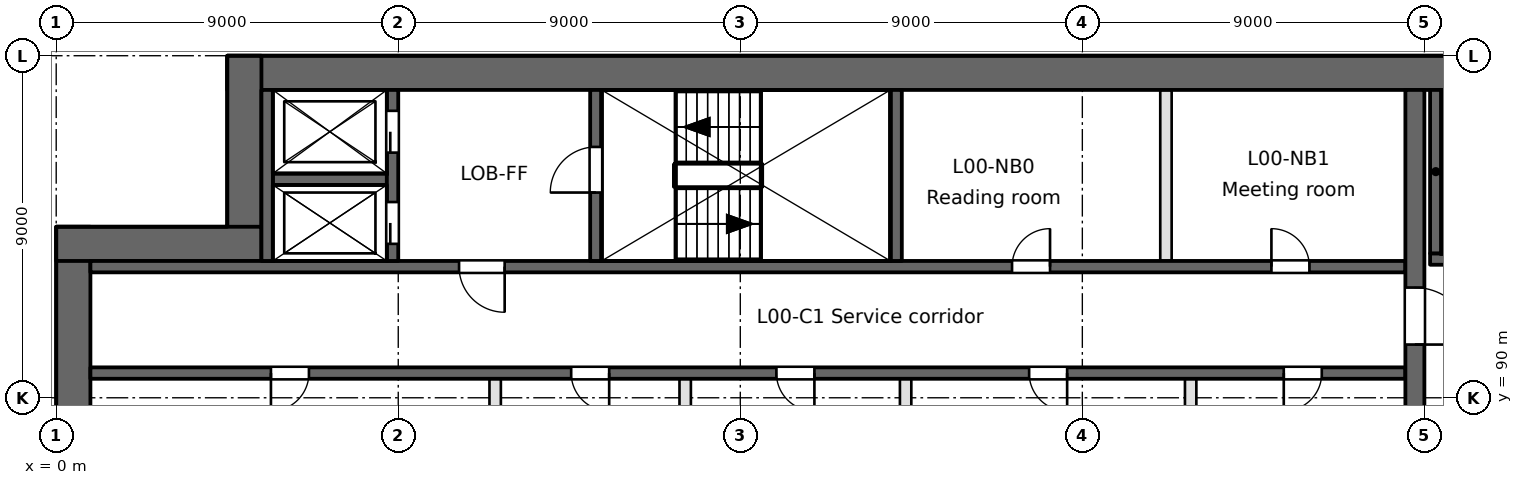
"""IFC4 building model, lengths in metres.
Left out: names, types, materials, properties, quantities, classifications, styles, units other than length and angle.
Written with IfcOpenShell. Run it as: python <this file> out.ifc"""

import sys

from ifc_helpers import new_model, si_unit, direction, frame, frame_2d, origin, place, context, subcontext, project, spatial, rectangle, extrude, element, fill, save


model = new_model("IFC4")
c1 = context("Model", 3, precision=1e-05, world=origin(), true_north=direction((0.0, 1.0)))
c2 = subcontext(c1, "Body", "Model", "MODEL_VIEW")
j1 = project(units=[si_unit("LENGTHUNIT", "METRE"), si_unit("PLANEANGLEUNIT", "RADIAN")], contexts=[c1])
p1 = place(None, origin())
s1 = spatial("IfcSite", under=j1, at=p1, CompositionType="ELEMENT")
p2 = place(p1, origin())
s2 = spatial("IfcBuilding", under=s1, at=p2, CompositionType="ELEMENT")
p3 = place(p2, origin())
s3 = spatial("IfcBuildingStorey", under=s2, at=p3, CompositionType="ELEMENT", Elevation=0.0)
p4 = place(p3, frame((0.45, 94.5, 0.0), z_axis=(0.0, 0.0, 1.0), x_axis=(0.0, -1.0, 0.0)))
e1 = element("IfcWall", 1, at=p4, inside=s3, PredefinedType="SHEAR", context=c2, shape_type="SweptSolid", body=[
    extrude(rectangle(XDim=66.085, YDim=0.9, at=frame_2d((33.042, 0.0))), origin(), (0.0, 0.0, 1.0), 6.0),
])
p5 = place(p4, frame((50.025, 0.0, 0.0)))
e2 = element("IfcOpeningElement", 2, at=p5, cuts=e1, PredefinedType="OPENING", context=c2, shape_type="SweptSolid", body=[
    extrude(rectangle(XDim=1.2, YDim=2.1, at=frame_2d((0.6, 1.05))), frame((0.0, 0.45, 0.0), z_axis=(0.0, -1.0, 0.0), x_axis=(1.0, 0.0, 0.0)), (0.0, 0.0, 1.0), 0.9),
])
p6 = place(p3, frame((94.5, 98.55, 0.0), z_axis=(0.0, 0.0, 1.0), x_axis=(-1.0, 0.0, 0.0)))
e3 = element("IfcWall", 3, at=p6, inside=s3, PredefinedType="SHEAR", context=c2, shape_type="SweptSolid", body=[
    extrude(rectangle(XDim=90.0, YDim=0.9, at=frame_2d((45.0, 0.0))), origin(), (0.0, 0.0, 1.0), 6.0),
])
p7 = place(p6, frame((25.99, 0.0, 0.0)))
e4 = element("IfcOpeningElement", 4, at=p7, cuts=e3, PredefinedType="OPENING", context=c2, shape_type="SweptSolid", body=[
    extrude(rectangle(XDim=3.5, YDim=3.5, at=frame_2d((1.75, 1.75))), frame((0.0, 0.45, 0.0), z_axis=(0.0, -1.0, 0.0), x_axis=(1.0, 0.0, 0.0)), (0.0, 0.0, 1.0), 0.9),
])
for number, where, z_axis, x_axis in (
    (5, (4.95, 99.0, 0.0), (0.0, 0.0, 1.0), (0.0, -1.0, 0.0)),
    (6, (5.4, 94.05, 0.0), (0.0, 0.0, 1.0), (-1.0, 0.0, 0.0)),
):
    element("IfcWall", number, at=place(p3, frame(where, z_axis=z_axis, x_axis=x_axis)), inside=s3, PredefinedType="SHEAR", context=c2, shape_type="SweptSolid", body=[
        extrude(rectangle(XDim=5.4, YDim=0.9, at=frame_2d((2.7, 0.0))), origin(), (0.0, 0.0, 1.0), 6.0),
    ])
p8 = place(p3, frame((0.9, 90.65, -0.4), z_axis=(0.0, 0.0, 1.0), x_axis=(1.0, 0.0, 0.0)))
e7 = element("IfcWall", 7, at=p8, inside=s3, PredefinedType="SOLIDWALL", context=c2, shape_type="SweptSolid", body=[
    extrude(rectangle(XDim=34.6, YDim=0.3, at=frame_2d((17.3, 0.0))), origin(), (0.0, 0.0, 1.0), 6.05),
])
p9 = place(p8, frame((4.75, 0.0, 0.4)))
e8 = element("IfcOpeningElement", 8, at=p9, cuts=e7, PredefinedType="OPENING", context=c2, shape_type="SweptSolid", body=[
    extrude(rectangle(XDim=1.0, YDim=2.1, at=frame_2d((0.5, 1.05))), frame((0.0, 0.15, 0.0), z_axis=(0.0, -1.0, 0.0), x_axis=(1.0, 0.0, 0.0)), (0.0, 0.0, 1.0), 0.3),
])
p10 = place(p8, frame((24.7, 0.0, 0.4)))
e9 = element("IfcOpeningElement", 9, at=p10, cuts=e7, PredefinedType="OPENING", context=c2, shape_type="SweptSolid", body=[
    extrude(rectangle(XDim=1.0, YDim=2.1, at=frame_2d((0.5, 1.05))), frame((0.0, 0.15, 0.0), z_axis=(0.0, -1.0, 0.0), x_axis=(1.0, 0.0, 0.0)), (0.0, 0.0, 1.0), 0.3),
])
p11 = place(p8, frame((12.65, 0.0, 0.4)))
e10 = element("IfcOpeningElement", 10, at=p11, cuts=e7, PredefinedType="OPENING", context=c2, shape_type="SweptSolid", body=[
    extrude(rectangle(XDim=1.0, YDim=2.1, at=frame_2d((0.5, 1.05))), frame((0.0, 0.15, 0.0), z_axis=(0.0, -1.0, 0.0), x_axis=(1.0, 0.0, 0.0)), (0.0, 0.0, 1.0), 0.3),
])
p12 = place(p8, frame((18.05, 0.0, 0.4)))
e11 = element("IfcOpeningElement", 11, at=p12, cuts=e7, PredefinedType="OPENING", context=c2, shape_type="SweptSolid", body=[
    extrude(rectangle(XDim=1.0, YDim=2.1, at=frame_2d((0.5, 1.05))), frame((0.0, 0.15, 0.0), z_axis=(0.0, -1.0, 0.0), x_axis=(1.0, 0.0, 0.0)), (0.0, 0.0, 1.0), 0.3),
])
p13 = place(p8, frame((31.4, 0.0, 0.4)))
e12 = element("IfcOpeningElement", 12, at=p13, cuts=e7, PredefinedType="OPENING", context=c2, shape_type="SweptSolid", body=[
    extrude(rectangle(XDim=1.0, YDim=2.1, at=frame_2d((0.5, 1.05))), frame((0.0, 0.15, 0.0), z_axis=(0.0, -1.0, 0.0), x_axis=(1.0, 0.0, 0.0)), (0.0, 0.0, 1.0), 0.3),
])
p14 = place(p3, frame((0.9, 93.45, -0.4), z_axis=(0.0, 0.0, 1.0), x_axis=(1.0, 0.0, 0.0)))
e13 = element("IfcWall", 13, at=p14, inside=s3, PredefinedType="SOLIDWALL", context=c2, shape_type="SweptSolid", body=[
    extrude(rectangle(XDim=34.6, YDim=0.3, at=frame_2d((17.3, 0.0))), origin(), (0.0, 0.0, 1.0), 6.05),
])
p15 = place(p14, frame((9.7, 0.0, 0.4)))
e14 = element("IfcOpeningElement", 14, at=p15, cuts=e13, PredefinedType="OPENING", context=c2, shape_type="SweptSolid", body=[
    extrude(rectangle(XDim=1.2, YDim=2.1, at=frame_2d((0.6, 1.05))), frame((0.0, 0.15, 0.0), z_axis=(0.0, -1.0, 0.0), x_axis=(1.0, 0.0, 0.0)), (0.0, 0.0, 1.0), 0.3),
])
p16 = place(p14, frame((24.25, 0.0, 0.4)))
e15 = element("IfcOpeningElement", 15, at=p16, cuts=e13, PredefinedType="OPENING", context=c2, shape_type="SweptSolid", body=[
    extrude(rectangle(XDim=1.0, YDim=2.1, at=frame_2d((0.5, 1.05))), frame((0.0, 0.15, 0.0), z_axis=(0.0, -1.0, 0.0), x_axis=(1.0, 0.0, 0.0)), (0.0, 0.0, 1.0), 0.3),
])
p17 = place(p14, frame((31.075, 0.0, 0.4)))
e16 = element("IfcOpeningElement", 16, at=p17, cuts=e13, PredefinedType="OPENING", context=c2, shape_type="SweptSolid", body=[
    extrude(rectangle(XDim=1.0, YDim=2.1, at=frame_2d((0.5, 1.05))), frame((0.0, 0.15, 0.0), z_axis=(0.0, -1.0, 0.0), x_axis=(1.0, 0.0, 0.0)), (0.0, 0.0, 1.0), 0.3),
])
p18 = place(p3, frame((36.15, 93.65, -0.4), z_axis=(0.0, 0.0, 1.0), x_axis=(1.0, 0.0, 0.0)))
e17 = element("IfcWall", 17, at=p18, inside=s3, PredefinedType="SOLIDWALL", context=c2, shape_type="SweptSolid", body=[
    extrude(rectangle(XDim=8.2, YDim=0.3, at=frame_2d((4.1, 0.0))), origin(), (0.0, 0.0, 1.0), 6.05),
])
p19 = place(p18, frame((0.7, 0.0, 0.4)))
e18 = element("IfcOpeningElement", 18, at=p19, cuts=e17, PredefinedType="OPENING", context=c2, shape_type="SweptSolid", body=[
    extrude(rectangle(XDim=1.2, YDim=2.1, at=frame_2d((0.6, 1.05))), frame((0.0, 0.15, 0.0), z_axis=(0.0, -1.0, 0.0), x_axis=(1.0, 0.0, 0.0)), (0.0, 0.0, 1.0), 0.3),
])
p20 = place(p3, frame((5.7, 95.75, -0.4), z_axis=(0.0, 0.0, 1.0), x_axis=(1.0, 0.0, 0.0)))
e19 = element("IfcWall", 19, at=p20, inside=s3, PredefinedType="SOLIDWALL", context=c2, shape_type="SweptSolid", body=[
    extrude(rectangle(XDim=3.0, YDim=0.3, at=frame_2d((1.5, 0.0))), origin(), (0.0, 0.0, 1.0), 6.05),
])
p21 = place(p3, frame((5.55, 93.6, -0.4), z_axis=(0.0, 0.0, 1.0), x_axis=(0.0, 1.0, 0.0)))
e20 = element("IfcWall", 20, at=p21, inside=s3, PredefinedType="SOLIDWALL", context=c2, shape_type="SweptSolid", body=[
    extrude(rectangle(XDim=4.5, YDim=0.3, at=frame_2d((2.25, 0.0))), origin(), (0.0, 0.0, 1.0), 6.05),
])
p22 = place(p3, frame((8.85, 93.6, -0.4), z_axis=(0.0, 0.0, 1.0), x_axis=(0.0, 1.0, 0.0)))
e21 = element("IfcWall", 21, at=p22, inside=s3, PredefinedType="SOLIDWALL", context=c2, shape_type="SweptSolid", body=[
    extrude(rectangle(XDim=4.5, YDim=0.3, at=frame_2d((2.25, 0.0))), origin(), (0.0, 0.0, 1.0), 6.05),
])
p23 = place(p22, frame((0.45, 0.0, 0.4)))
e22 = element("IfcOpeningElement", 22, at=p23, cuts=e21, PredefinedType="OPENING", context=c2, shape_type="SweptSolid", body=[
    extrude(rectangle(XDim=1.1, YDim=2.1, at=frame_2d((0.55, 1.05))), frame((0.0, 0.15, 0.0), z_axis=(0.0, -1.0, 0.0), x_axis=(1.0, 0.0, 0.0)), (0.0, 0.0, 1.0), 0.3),
])
p24 = place(p22, frame((2.85, 0.0, 0.4)))
e23 = element("IfcOpeningElement", 23, at=p24, cuts=e21, PredefinedType="OPENING", context=c2, shape_type="SweptSolid", body=[
    extrude(rectangle(XDim=1.1, YDim=2.1, at=frame_2d((0.55, 1.05))), frame((0.0, 0.15, 0.0), z_axis=(0.0, -1.0, 0.0), x_axis=(1.0, 0.0, 0.0)), (0.0, 0.0, 1.0), 0.3),
])
p25 = place(p3, frame((11.55, 87.95, 0.0), z_axis=(0.0, 0.0, 1.0), x_axis=(0.0, 1.0, 0.0)))
e24 = element("IfcWall", 24, at=p25, inside=s3, PredefinedType="PARTITIONING", context=c2, shape_type="SweptSolid", body=[
    extrude(rectangle(XDim=2.55, YDim=0.3, at=frame_2d((1.275, 0.0))), origin(), (0.0, 0.0, 1.0), 5.65),
])
p26 = place(p3, frame((14.2, 93.6, -0.4), z_axis=(0.0, 0.0, 1.0), x_axis=(0.0, 1.0, 0.0)))
e25 = element("IfcWall", 25, at=p26, inside=s3, PredefinedType="SOLIDWALL", context=c2, shape_type="SweptSolid", body=[
    extrude(rectangle(XDim=4.5, YDim=0.3, at=frame_2d((2.25, 0.0))), origin(), (0.0, 0.0, 1.0), 6.05),
])
p27 = place(p26, frame((1.8, 0.0, 0.4)))
e26 = element("IfcOpeningElement", 26, at=p27, cuts=e25, PredefinedType="OPENING", context=c2, shape_type="SweptSolid", body=[
    extrude(rectangle(XDim=1.2, YDim=2.1, at=frame_2d((0.6, 1.05))), frame((0.0, 0.15, 0.0), z_axis=(0.0, -1.0, 0.0), x_axis=(1.0, 0.0, 0.0)), (0.0, 0.0, 1.0), 0.3),
])
p28 = place(p3, frame((16.55, 77.55, 0.0), z_axis=(0.0, 0.0, 1.0), x_axis=(0.0, 1.0, 0.0)))
e27 = element("IfcWall", 27, at=p28, inside=s3, PredefinedType="PARTITIONING", context=c2, shape_type="SweptSolid", body=[
    extrude(rectangle(XDim=12.95, YDim=0.3, at=frame_2d((6.475, 0.0))), origin(), (0.0, 0.0, 1.0), 5.65),
])
p29 = place(p3, frame((22.1, 93.6, -0.4), z_axis=(0.0, 0.0, 1.0), x_axis=(0.0, 1.0, 0.0)))
e28 = element("IfcWall", 28, at=p29, inside=s3, PredefinedType="SOLIDWALL", context=c2, shape_type="SweptSolid", body=[
    extrude(rectangle(XDim=4.5, YDim=0.3, at=frame_2d((2.25, 0.0))), origin(), (0.0, 0.0, 1.0), 6.05),
])
p30 = place(p3, frame((22.35, 87.95, 0.0), z_axis=(0.0, 0.0, 1.0), x_axis=(0.0, 1.0, 0.0)))
e29 = element("IfcWall", 29, at=p30, inside=s3, PredefinedType="PARTITIONING", context=c2, shape_type="SweptSolid", body=[
    extrude(rectangle(XDim=2.55, YDim=0.3, at=frame_2d((1.275, 0.0))), origin(), (0.0, 0.0, 1.0), 5.65),
])
p31 = place(p3, frame((29.2, 93.6, 0.0), z_axis=(0.0, 0.0, 1.0), x_axis=(0.0, 1.0, 0.0)))
e30 = element("IfcWall", 30, at=p31, inside=s3, PredefinedType="PARTITIONING", context=c2, shape_type="SweptSolid", body=[
    extrude(rectangle(XDim=4.5, YDim=0.3, at=frame_2d((2.25, 0.0))), origin(), (0.0, 0.0, 1.0), 5.65),
])
p32 = place(p3, frame((29.85, 87.95, 0.0), z_axis=(0.0, 0.0, 1.0), x_axis=(0.0, 1.0, 0.0)))
e31 = element("IfcWall", 31, at=p32, inside=s3, PredefinedType="PARTITIONING", context=c2, shape_type="SweptSolid", body=[
    extrude(rectangle(XDim=2.55, YDim=0.3, at=frame_2d((1.275, 0.0))), origin(), (0.0, 0.0, 1.0), 5.65),
])
p33 = place(p3, frame((35.75, 63.5, -0.4), z_axis=(0.0, 0.0, 1.0), x_axis=(0.0, 1.0, 0.0)))
e32 = element("IfcWall", 32, at=p33, inside=s3, PredefinedType="SOLIDWALL", context=c2, shape_type="SweptSolid", body=[
    extrude(rectangle(XDim=34.6, YDim=0.5, at=frame_2d((17.3, 0.0))), origin(), (0.0, 0.0, 1.0), 6.05),
])
p34 = place(p33, frame((9.7, 0.0, 0.4)))
e33 = element("IfcOpeningElement", 33, at=p34, cuts=e32, PredefinedType="OPENING", context=c2, shape_type="SweptSolid", body=[
    extrude(rectangle(XDim=2.4, YDim=2.1, at=frame_2d((1.2, 1.05))), frame((0.0, 0.25, 0.0), z_axis=(0.0, -1.0, 0.0), x_axis=(1.0, 0.0, 0.0)), (0.0, 0.0, 1.0), 0.5),
])
p35 = place(p33, frame((27.9, 0.0, 0.4)))
e34 = element("IfcOpeningElement", 34, at=p35, cuts=e32, PredefinedType="OPENING", context=c2, shape_type="SweptSolid", body=[
    extrude(rectangle(XDim=1.5, YDim=2.1, at=frame_2d((0.75, 1.05))), frame((0.0, 0.25, 0.0), z_axis=(0.0, -1.0, 0.0), x_axis=(1.0, 0.0, 0.0)), (0.0, 0.0, 1.0), 0.5),
])
p36 = place(p33, frame((1.5, 0.0, 0.4)))
e35 = element("IfcOpeningElement", 35, at=p36, cuts=e32, PredefinedType="OPENING", context=c2, shape_type="SweptSolid", body=[
    extrude(rectangle(XDim=1.2, YDim=2.1, at=frame_2d((0.6, 1.05))), frame((0.0, 0.25, 0.0), z_axis=(0.0, -1.0, 0.0), x_axis=(1.0, 0.0, 0.0)), (0.0, 0.0, 1.0), 0.5),
])
p37 = place(p3, frame((36.3, 93.8, -0.4), z_axis=(0.0, 0.0, 1.0), x_axis=(0.0, 1.0, 0.0)))
e36 = element("IfcWall", 36, at=p37, inside=s3, PredefinedType="SOLIDWALL", context=c2, shape_type="SweptSolid", body=[
    extrude(rectangle(XDim=4.3, YDim=0.3, at=frame_2d((2.15, 0.0))), origin(), (0.0, 0.0, 1.0), 6.05),
])
p38 = place(p23, origin())
e37 = element("IfcDoor", 37, at=p38, inside=s3, OperationType="SLIDING_TO_RIGHT", PredefinedType="DOOR", context=c2, shape_type="SweptSolid", body=[
    extrude(rectangle(XDim=1.1, YDim=2.1, at=frame_2d((0.55, 1.05))), frame((0.0, 0.025, 0.0), z_axis=(0.0, -1.0, 0.0), x_axis=(1.0, 0.0, 0.0)), (0.0, 0.0, 1.0), 0.05),
])
fill(e22, e37)
p39 = place(p24, origin())
e38 = element("IfcDoor", 38, at=p39, inside=s3, OperationType="SLIDING_TO_LEFT", PredefinedType="DOOR", context=c2, shape_type="SweptSolid", body=[
    extrude(rectangle(XDim=1.1, YDim=2.1, at=frame_2d((0.55, 1.05))), frame((0.0, 0.025, 0.0), z_axis=(0.0, -1.0, 0.0), x_axis=(1.0, 0.0, 0.0)), (0.0, 0.0, 1.0), 0.05),
])
fill(e23, e38)
p40 = place(p15, frame((1.2, 0.0, 0.0), z_axis=(0.0, 0.0, 1.0), x_axis=(-1.0, 0.0, 0.0)))
e39 = element("IfcDoor", 39, at=p40, inside=s3, OperationType="SINGLE_SWING_LEFT", PredefinedType="DOOR", context=c2, shape_type="SweptSolid", body=[
    extrude(rectangle(XDim=1.2, YDim=2.1, at=frame_2d((0.6, 1.05))), frame((0.0, 0.025, 0.0), z_axis=(0.0, -1.0, 0.0), x_axis=(1.0, 0.0, 0.0)), (0.0, 0.0, 1.0), 0.05),
])
fill(e14, e39)
p41 = place(p35, frame((1.5, 0.0, 0.0), z_axis=(0.0, 0.0, 1.0), x_axis=(-1.0, 0.0, 0.0)))
e40 = element("IfcDoor", 40, at=p41, inside=s3, OperationType="SINGLE_SWING_RIGHT", PredefinedType="DOOR", context=c2, shape_type="SweptSolid", body=[
    extrude(rectangle(XDim=1.5, YDim=2.1, at=frame_2d((0.75, 1.05))), frame((0.0, 0.025, 0.0), z_axis=(0.0, -1.0, 0.0), x_axis=(1.0, 0.0, 0.0)), (0.0, 0.0, 1.0), 0.05),
])
fill(e34, e40)
p42 = place(p27, origin())
e41 = element("IfcDoor", 41, at=p42, inside=s3, OperationType="SINGLE_SWING_LEFT", PredefinedType="DOOR", context=c2, shape_type="SweptSolid", body=[
    extrude(rectangle(XDim=1.2, YDim=2.1, at=frame_2d((0.6, 1.05))), frame((0.0, 0.025, 0.0), z_axis=(0.0, -1.0, 0.0), x_axis=(1.0, 0.0, 0.0)), (0.0, 0.0, 1.0), 0.05),
])
fill(e26, e41)
p43 = place(p9, frame((1.0, 0.0, 0.0), z_axis=(0.0, 0.0, 1.0), x_axis=(-1.0, 0.0, 0.0)))
e42 = element("IfcDoor", 42, at=p43, inside=s3, OperationType="SINGLE_SWING_RIGHT", PredefinedType="DOOR", context=c2, shape_type="SweptSolid", body=[
    extrude(rectangle(XDim=1.0, YDim=2.1, at=frame_2d((0.5, 1.05))), frame((0.0, 0.025, 0.0), z_axis=(0.0, -1.0, 0.0), x_axis=(1.0, 0.0, 0.0)), (0.0, 0.0, 1.0), 0.05),
])
fill(e8, e42)
p44 = place(p10, frame((1.0, 0.0, 0.0), z_axis=(0.0, 0.0, 1.0), x_axis=(-1.0, 0.0, 0.0)))
e43 = element("IfcDoor", 43, at=p44, inside=s3, OperationType="SINGLE_SWING_LEFT", PredefinedType="DOOR", context=c2, shape_type="SweptSolid", body=[
    extrude(rectangle(XDim=1.0, YDim=2.1, at=frame_2d((0.5, 1.05))), frame((0.0, 0.025, 0.0), z_axis=(0.0, -1.0, 0.0), x_axis=(1.0, 0.0, 0.0)), (0.0, 0.0, 1.0), 0.05),
])
fill(e9, e43)
p45 = place(p11, frame((1.0, 0.0, 0.0), z_axis=(0.0, 0.0, 1.0), x_axis=(-1.0, 0.0, 0.0)))
e44 = element("IfcDoor", 44, at=p45, inside=s3, OperationType="SINGLE_SWING_LEFT", PredefinedType="DOOR", context=c2, shape_type="SweptSolid", body=[
    extrude(rectangle(XDim=1.0, YDim=2.1, at=frame_2d((0.5, 1.05))), frame((0.0, 0.025, 0.0), z_axis=(0.0, -1.0, 0.0), x_axis=(1.0, 0.0, 0.0)), (0.0, 0.0, 1.0), 0.05),
])
fill(e10, e44)
p46 = place(p12, frame((1.0, 0.0, 0.0), z_axis=(0.0, 0.0, 1.0), x_axis=(-1.0, 0.0, 0.0)))
e45 = element("IfcDoor", 45, at=p46, inside=s3, OperationType="SINGLE_SWING_LEFT", PredefinedType="DOOR", context=c2, shape_type="SweptSolid", body=[
    extrude(rectangle(XDim=1.0, YDim=2.1, at=frame_2d((0.5, 1.05))), frame((0.0, 0.025, 0.0), z_axis=(0.0, -1.0, 0.0), x_axis=(1.0, 0.0, 0.0)), (0.0, 0.0, 1.0), 0.05),
])
fill(e11, e45)
p47 = place(p13, frame((1.0, 0.0, 0.0), z_axis=(0.0, 0.0, 1.0), x_axis=(-1.0, 0.0, 0.0)))
e46 = element("IfcDoor", 46, at=p47, inside=s3, OperationType="SINGLE_SWING_RIGHT", PredefinedType="DOOR", context=c2, shape_type="SweptSolid", body=[
    extrude(rectangle(XDim=1.0, YDim=2.1, at=frame_2d((0.5, 1.05))), frame((0.0, 0.025, 0.0), z_axis=(0.0, -1.0, 0.0), x_axis=(1.0, 0.0, 0.0)), (0.0, 0.0, 1.0), 0.05),
])
fill(e12, e46)
p48 = place(p16, origin())
e47 = element("IfcDoor", 47, at=p48, inside=s3, OperationType="SINGLE_SWING_RIGHT", PredefinedType="DOOR", context=c2, shape_type="SweptSolid", body=[
    extrude(rectangle(XDim=1.0, YDim=2.1, at=frame_2d((0.5, 1.05))), frame((0.0, 0.025, 0.0), z_axis=(0.0, -1.0, 0.0), x_axis=(1.0, 0.0, 0.0)), (0.0, 0.0, 1.0), 0.05),
])
fill(e15, e47)
p49 = place(p17, origin())
e48 = element("IfcDoor", 48, at=p49, inside=s3, OperationType="SINGLE_SWING_LEFT", PredefinedType="DOOR", context=c2, shape_type="SweptSolid", body=[
    extrude(rectangle(XDim=1.0, YDim=2.1, at=frame_2d((0.5, 1.05))), frame((0.0, 0.025, 0.0), z_axis=(0.0, -1.0, 0.0), x_axis=(1.0, 0.0, 0.0)), (0.0, 0.0, 1.0), 0.05),
])
fill(e16, e48)
save(model, sys.argv[1])
